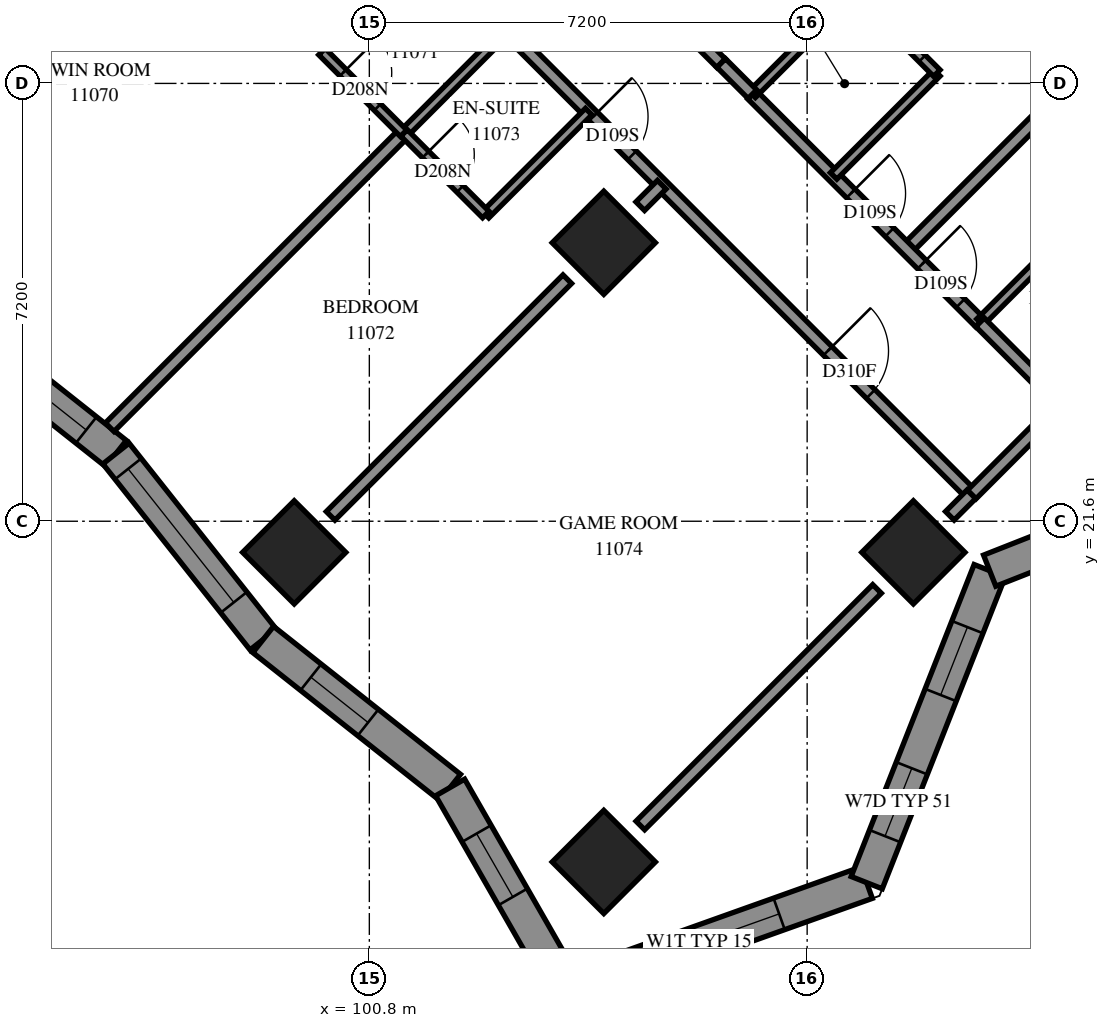
"""IFC4 building model, lengths in metres.
Left out: names, types, materials, properties, quantities, classifications, styles, units other than length and angle.
Written with IfcOpenShell. Run it as: python <this file> out.ifc"""

import sys

from ifc_helpers import new_model, si_unit, direction, frame, frame_2d, origin, origin_2d, place, context, subcontext, project, spatial, polyline, rectangle, outline, extrude, element, fill, save


model = new_model("IFC4")
c1 = context("Model", 3, precision=1e-05, world=origin(), true_north=direction((0.0, 1.0)))
c2 = subcontext(c1, "Body", "Model", "MODEL_VIEW")
j1 = project(units=[si_unit("LENGTHUNIT", "METRE"), si_unit("PLANEANGLEUNIT", "RADIAN")], contexts=[c1])
p1 = place(None, origin())
s1 = spatial("IfcSite", under=j1, at=p1, CompositionType="ELEMENT")
p2 = place(p1, origin())
s2 = spatial("IfcBuilding", under=s1, at=p2, CompositionType="ELEMENT")
p3 = place(p2, frame((0.0, 0.0, 44.0)))
s3 = spatial("IfcBuildingStorey", under=s2, at=p3, CompositionType="ELEMENT", Elevation=44.0)
for number, where, z_axis, x_axis in (
    (1, (104.656, 26.18, 0.0), (0.0, 0.0, 1.0), (0.707, -0.707, 0.0)),
    (2, (99.565, 21.088, 0.0), (0.0, 0.0, 1.0), (0.707, -0.707, 0.0)),
    (3, (109.747, 21.088, 0.0), (0.0, 0.0, 1.0), (0.707, -0.707, 0.0)),
    (4, (104.656, 15.997, 0.0), (0.0, 0.0, 1.0), (0.707, -0.707, 0.0)),
):
    element("IfcColumn", number, at=place(p3, frame(where, z_axis=z_axis, x_axis=x_axis)), inside=s3, PredefinedType="COLUMN", context=c2, shape_type="SweptSolid", body=[
        extrude(rectangle(XDim=1.2, YDim=1.2, at=origin_2d()), origin(), (0.0, 0.0, 1.0), 3.1),
    ])
p4 = place(p3, frame((104.037, 13.893, 0.0), z_axis=(0.0, 0.0, 1.0), x_axis=(0.9418436094, 0.3360515071, 0.0)))
e5 = element("IfcWall", 5, at=p4, inside=s3, PredefinedType="SOLIDWALL", context=c2, shape_type="SweptSolid", body=[
    extrude(outline(polyline([(-0.23, -0.275), (5.373, -0.275), (5.123, 0.275), (0.23, 0.275), (-0.23, -0.275)])), origin(), (0.0, 0.0, 1.0), 3.1),
])
p5 = place(p4, frame((0.919, 0.0, 0.5)))
e6 = element("IfcOpeningElement", 6, at=p5, cuts=e5, PredefinedType="OPENING", context=c2, shape_type="SweptSolid", body=[
    extrude(rectangle(XDim=2.8, YDim=2.45, at=frame_2d((1.4, 1.225))), frame((0.0, 0.285, 0.0), z_axis=(0.0, -1.0, 0.0), x_axis=(1.0, 0.0, 0.0)), (0.0, 0.0, 1.0), 0.57),
])
p6 = place(p3, frame((108.98, 15.657, 0.0), z_axis=(0.0, 0.0, 1.0), x_axis=(0.3667119279, 0.930334543, 0.0)))
e7 = element("IfcWall", 7, at=p6, inside=s3, PredefinedType="SOLIDWALL", context=c2, shape_type="SweptSolid", body=[
    extrude(outline(polyline([(-0.125, -0.275), (5.395, -0.275), (5.634, 0.275), (0.125, 0.275), (-0.125, -0.275)])), origin(), (0.0, 0.0, 1.0), 3.1),
])
p7 = place(p6, frame((0.822, 0.0, 0.5)))
e8 = element("IfcOpeningElement", 8, at=p7, cuts=e7, PredefinedType="OPENING", context=c2, shape_type="SweptSolid", body=[
    extrude(rectangle(XDim=1.2, YDim=2.45, at=frame_2d((0.6, 1.225))), frame((0.0, 0.285, 0.0), z_axis=(0.0, -1.0, 0.0), x_axis=(1.0, 0.0, 0.0)), (0.0, 0.0, 1.0), 0.57),
])
p8 = place(p6, frame((3.317, 0.0, 0.5)))
e9 = element("IfcOpeningElement", 9, at=p8, cuts=e7, PredefinedType="OPENING", context=c2, shape_type="SweptSolid", body=[
    extrude(rectangle(XDim=1.2, YDim=2.45, at=frame_2d((0.6, 1.225))), frame((0.0, 0.285, 0.0), z_axis=(0.0, -1.0, 0.0), x_axis=(1.0, 0.0, 0.0)), (0.0, 0.0, 1.0), 0.57),
])
p9 = place(p3, frame((111.002, 20.787, 0.0), z_axis=(0.0, 0.0, 1.0), x_axis=(0.930334543, 0.3667119279, 0.0)))
e10 = element("IfcWall", 10, at=p9, inside=s3, PredefinedType="SOLIDWALL", context=c2, shape_type="SweptSolid", body=[
    extrude(outline(polyline([(0.119, -0.275), (5.64, -0.275), (5.39, 0.275), (-0.119, 0.275), (0.119, -0.275)])), origin(), (0.0, 0.0, 1.0), 3.1),
])
p10 = place(p9, frame((1.178, 0.0, 0.5)))
e11 = element("IfcOpeningElement", 11, at=p10, cuts=e10, PredefinedType="OPENING", context=c2, shape_type="SweptSolid", body=[
    extrude(rectangle(XDim=2.8, YDim=2.45, at=frame_2d((1.4, 1.225))), frame((0.0, 0.285, 0.0), z_axis=(0.0, -1.0, 0.0), x_axis=(1.0, 0.0, 0.0)), (0.0, 0.0, 1.0), 0.57),
])
p11 = place(p3, frame((93.576, 25.134, 0.0), z_axis=(0.0, 0.0, 1.0), x_axis=(0.7841326465, -0.6205932587, 0.0)))
e12 = element("IfcWall", 12, at=p11, inside=s3, PredefinedType="SOLIDWALL", context=c2, shape_type="SweptSolid", body=[
    extrude(outline(polyline([(-0.032, -0.275), (3.868, -0.275), (3.932, 0.275), (0.032, 0.275), (-0.032, -0.275)])), origin(), (0.0, 0.0, 1.0), 3.1),
])
p12 = place(p11, frame((0.475, 0.0, 0.5)))
e13 = element("IfcOpeningElement", 13, at=p12, cuts=e12, PredefinedType="OPENING", context=c2, shape_type="SweptSolid", body=[
    extrude(rectangle(XDim=2.8, YDim=2.45, at=frame_2d((1.4, 1.225))), frame((0.0, 0.285, 0.0), z_axis=(0.0, -1.0, 0.0), x_axis=(1.0, 0.0, 0.0)), (0.0, 0.0, 1.0), 0.57),
])
p13 = place(p3, frame((96.634, 22.713, 0.0), z_axis=(0.0, 0.0, 1.0), x_axis=(0.6205932587, -0.7841326465, 0.0)))
e14 = element("IfcWall", 14, at=p13, inside=s3, PredefinedType="SOLIDWALL", context=c2, shape_type="SweptSolid", body=[
    extrude(outline(polyline([(0.032, -0.275), (3.932, -0.275), (3.868, 0.275), (-0.032, 0.275), (0.032, -0.275)])), origin(), (0.0, 0.0, 1.0), 3.1),
])
p14 = place(p13, frame((0.322, 0.0, 0.5)))
e15 = element("IfcOpeningElement", 15, at=p14, cuts=e14, PredefinedType="OPENING", context=c2, shape_type="SweptSolid", body=[
    extrude(rectangle(XDim=2.8, YDim=2.45, at=frame_2d((1.4, 1.225))), frame((0.0, 0.285, 0.0), z_axis=(0.0, -1.0, 0.0), x_axis=(1.0, 0.0, 0.0)), (0.0, 0.0, 1.0), 0.57),
])
p15 = place(p3, frame((99.054, 19.655, 0.0), z_axis=(0.0, 0.0, 1.0), x_axis=(0.7841399373, -0.6205840465, 0.0)))
e16 = element("IfcWall", 16, at=p15, inside=s3, PredefinedType="SOLIDWALL", context=c2, shape_type="SweptSolid", body=[
    extrude(outline(polyline([(-0.032, -0.275), (3.868, -0.275), (3.974, 0.275), (0.032, 0.275), (-0.032, -0.275)])), origin(), (0.0, 0.0, 1.0), 3.1),
])
p16 = place(p15, frame((1.0, 0.0, 0.5)))
e17 = element("IfcOpeningElement", 17, at=p16, cuts=e16, PredefinedType="OPENING", context=c2, shape_type="SweptSolid", body=[
    extrude(rectangle(XDim=1.2, YDim=2.45, at=frame_2d((0.6, 1.225))), frame((0.0, 0.285, 0.0), z_axis=(0.0, -1.0, 0.0), x_axis=(1.0, 0.0, 0.0)), (0.0, 0.0, 1.0), 0.57),
])
p17 = place(p3, frame((102.129, 17.222, 0.0), z_axis=(0.0, 0.0, 1.0), x_axis=(0.4972724343, -0.8675944479, 0.0)))
e18 = element("IfcWall", 18, at=p17, inside=s3, PredefinedType="SOLIDWALL", context=c2, shape_type="SweptSolid", body=[
    extrude(outline(polyline([(0.053, -0.275), (4.067, -0.275), (3.607, 0.275), (-0.053, 0.275), (0.053, -0.275)])), origin(), (0.0, 0.0, 1.0), 3.1),
])
p18 = place(p17, frame((0.875, 0.0, 0.5)))
e19 = element("IfcOpeningElement", 19, at=p18, cuts=e18, PredefinedType="OPENING", context=c2, shape_type="SweptSolid", body=[
    extrude(rectangle(XDim=1.2, YDim=2.45, at=frame_2d((0.6, 1.225))), frame((0.0, 0.285, 0.0), z_axis=(0.0, -1.0, 0.0), x_axis=(1.0, 0.0, 0.0)), (0.0, 0.0, 1.0), 0.57),
])
p19 = place(p3, frame((103.061, 29.677, 0.0), z_axis=(0.0, 0.0, 1.0), x_axis=(0.7071067812, -0.7071067812, 0.0)))
e20 = element("IfcWall", 20, at=p19, inside=s3, PredefinedType="PARTITIONING", context=c2, shape_type="SweptSolid", body=[
    extrude(rectangle(XDim=10.802, YDim=0.2, at=frame_2d((5.401, 0.0))), origin(), (0.0, 0.0, 1.0), 3.1),
])
p20 = place(p19, frame((2.012, 0.0, 0.0)))
e21 = element("IfcOpeningElement", 21, at=p20, cuts=e20, PredefinedType="OPENING", context=c2, shape_type="SweptSolid", body=[
    extrude(rectangle(XDim=0.9, YDim=2.1, at=frame_2d((0.45, 1.05))), frame((0.0, 0.11, 0.0), z_axis=(0.0, -1.0, 0.0), x_axis=(1.0, 0.0, 0.0)), (0.0, 0.0, 1.0), 0.22),
])
p21 = place(p19, frame((7.463, 0.0, 0.0)))
e22 = element("IfcOpeningElement", 22, at=p21, cuts=e20, PredefinedType="OPENING", context=c2, shape_type="SweptSolid", body=[
    extrude(rectangle(XDim=1.0, YDim=2.1, at=frame_2d((0.5, 1.05))), frame((0.0, 0.11, 0.0), z_axis=(0.0, -1.0, 0.0), x_axis=(1.0, 0.0, 0.0)), (0.0, 0.0, 1.0), 0.22),
])
p22 = place(p3, frame((96.53, 23.146, 0.0), z_axis=(0.0, 0.0, 1.0), x_axis=(0.7071140909, 0.7070994714, 0.0)))
e23 = element("IfcWall", 23, at=p22, inside=s3, PredefinedType="PARTITIONING", context=c2, shape_type="SweptSolid", body=[
    extrude(rectangle(XDim=6.84, YDim=0.2, at=frame_2d((3.42, 0.0))), origin(), (0.0, 0.0, 1.0), 3.1),
])
p23 = place(p3, frame((91.456, 28.255, 0.0), z_axis=(0.0, 0.0, 1.0), x_axis=(0.7071067812, 0.7071067812, 0.0)))
e24 = element("IfcWall", 24, at=p23, inside=s3, PredefinedType="PARTITIONING", context=c2, shape_type="SweptSolid", body=[
    extrude(rectangle(XDim=6.816, YDim=0.2, at=frame_2d((3.408, 0.0))), origin(), (0.0, 0.0, 1.0), 3.1),
])
p24 = place(p3, frame((109.64, 26.074, 0.0), z_axis=(0.0, 0.0, 1.0), x_axis=(0.7072538194, 0.7069597124, 0.0)))
e25 = element("IfcWall", 25, at=p24, inside=s3, PredefinedType="PARTITIONING", context=c2, shape_type="SweptSolid", body=[
    extrude(rectangle(XDim=6.8, YDim=0.2, at=frame_2d((3.4, 0.0))), origin(), (0.0, 0.0, 1.0), 3.1),
])
p25 = place(p3, frame((100.163, 21.689, 0.0), z_axis=(0.0, 0.0, 1.0), x_axis=(0.7071067812, 0.7071067812, 0.0)))
e26 = element("IfcWall", 26, at=p25, inside=s3, PredefinedType="PARTITIONING", context=c2, shape_type="SweptSolid", body=[
    extrude(rectangle(XDim=5.504, YDim=0.2, at=frame_2d((2.752, 0.0))), origin(), (0.0, 0.0, 1.0), 3.1),
])
p26 = place(p3, frame((105.257, 16.597, 0.0), z_axis=(0.0, 0.0, 1.0), x_axis=(0.7072884866, 0.706925029, 0.0)))
e27 = element("IfcWall", 27, at=p26, inside=s3, PredefinedType="PARTITIONING", context=c2, shape_type="SweptSolid", body=[
    extrude(rectangle(XDim=5.503, YDim=0.2, at=frame_2d((2.751, 0.0))), origin(), (0.0, 0.0, 1.0), 2.6),
])
p27 = place(p3, frame((107.093, 28.615, 0.0), z_axis=(0.0, 0.0, 1.0), x_axis=(0.7072011313, -0.7070124185, 0.0)))
e28 = element("IfcWall", 28, at=p27, inside=s3, PredefinedType="PARTITIONING", context=c2, shape_type="SweptSolid", body=[
    extrude(rectangle(XDim=5.299, YDim=0.2, at=frame_2d((2.65, 0.0))), origin(), (0.0, 0.0, 1.0), 3.1),
])
p28 = place(p27, frame((2.299, 0.0, 0.0)))
e29 = element("IfcOpeningElement", 29, at=p28, cuts=e28, PredefinedType="OPENING", context=c2, shape_type="SweptSolid", body=[
    extrude(rectangle(XDim=0.9, YDim=2.1, at=frame_2d((0.45, 1.05))), frame((0.0, 0.11, 0.0), z_axis=(0.0, -1.0, 0.0), x_axis=(1.0, 0.0, 0.0)), (0.0, 0.0, 1.0), 0.22),
])
p29 = place(p27, frame((3.949, 0.0, 0.0)))
e30 = element("IfcOpeningElement", 30, at=p29, cuts=e28, PredefinedType="OPENING", context=c2, shape_type="SweptSolid", body=[
    extrude(rectangle(XDim=0.9, YDim=2.1, at=frame_2d((0.45, 1.05))), frame((0.0, 0.11, 0.0), z_axis=(0.0, -1.0, 0.0), x_axis=(1.0, 0.0, 0.0)), (0.0, 0.0, 1.0), 0.22),
])
p30 = place(p3, frame((104.551, 31.165, 0.0), z_axis=(0.0, 0.0, 1.0), x_axis=(0.7074545101, -0.7067588812, 0.0)))
e31 = element("IfcWall", 31, at=p30, inside=s3, PredefinedType="PARTITIONING", context=c2, shape_type="SweptSolid", body=[
    extrude(rectangle(XDim=2.875, YDim=0.2, at=frame_2d((1.438, 0.0))), origin(), (0.0, 0.0, 1.0), 3.1),
])
p31 = place(p30, frame((0.148, 0.0, 0.0)))
e32 = element("IfcOpeningElement", 32, at=p31, cuts=e31, PredefinedType="OPENING", context=c2, shape_type="SweptSolid", body=[
    extrude(rectangle(XDim=0.9, YDim=2.1, at=frame_2d((0.45, 1.05))), frame((0.0, 0.11, 0.0), z_axis=(0.0, -1.0, 0.0), x_axis=(1.0, 0.0, 0.0)), (0.0, 0.0, 1.0), 0.22),
])
p32 = place(p3, frame((100.023, 29.327, 0.0), z_axis=(0.0, 0.0, 1.0), x_axis=(0.7071067812, 0.7071067812, 0.0)))
e33 = element("IfcWall", 33, at=p32, inside=s3, PredefinedType="PARTITIONING", context=c2, shape_type="SweptSolid", body=[
    extrude(rectangle(XDim=2.401, YDim=0.15, at=frame_2d((1.201, 0.0))), origin(), (0.0, 0.0, 1.0), 3.1),
])
for number, where, z_axis, x_axis in (
    (34, (101.371, 27.979, 0.0), (0.0, 0.0, 1.0), (0.707, 0.708, 0.0)),
    (35, (108.435, 27.279, 0.0), (0.0, 0.0, 1.0), (0.708, 0.707, 0.0)),
):
    element("IfcWall", number, at=place(p3, frame(where, z_axis=z_axis, x_axis=x_axis)), inside=s3, PredefinedType="PARTITIONING", context=c2, shape_type="SweptSolid", body=[
        extrude(rectangle(XDim=2.4, YDim=0.15, at=frame_2d((1.2, 0.0))), origin(), (0.0, 0.0, 1.0), 3.1),
    ])
for number, where, z_axis, x_axis in (
    (36, (102.711, 26.641, 0.0), (0.0, 0.0, 1.0), (0.707, 0.707, 0.0)),
    (37, (107.095, 28.621, 0.0), (0.0, 0.0, 1.0), (0.707, 0.707, 0.0)),
    (38, (110.843, 24.873, 0.0), (0.0, 0.0, 1.0), (0.707, 0.707, 0.0)),
):
    element("IfcWall", number, at=place(p3, frame(where, z_axis=z_axis, x_axis=x_axis)), inside=s3, PredefinedType="PARTITIONING", context=c2, shape_type="SweptSolid", body=[
        extrude(rectangle(XDim=2.398, YDim=0.15, at=frame_2d((1.199, 0.0))), origin(), (0.0, 0.0, 1.0), 3.1),
    ])
p33 = place(p3, frame((110.705, 22.039, 0.0), z_axis=(0.0, 0.0, 1.0), x_axis=(0.7066304548, 0.7075827869, 0.0)))
e39 = element("IfcWall", 39, at=p33, inside=s3, PredefinedType="PARTITIONING", context=c2, shape_type="SweptSolid", body=[
    extrude(rectangle(XDim=2.1, YDim=0.2, at=frame_2d((1.05, 0.0))), origin(), (0.0, 0.0, 1.0), 2.6),
])
p34 = place(p3, frame((100.021, 29.323, 0.0), z_axis=(0.0, 0.0, 1.0), x_axis=(0.7071067812, -0.7071067812, 0.0)))
e40 = element("IfcWall", 40, at=p34, inside=s3, PredefinedType="PARTITIONING", context=c2, shape_type="SweptSolid", body=[
    extrude(rectangle(XDim=1.901, YDim=0.15, at=frame_2d((0.95, 0.0))), origin(), (0.0, 0.0, 1.0), 3.1),
])
p35 = place(p34, frame((0.491, 0.0, 0.0)))
e41 = element("IfcOpeningElement", 41, at=p35, cuts=e40, PredefinedType="OPENING", context=c2, shape_type="SweptSolid", body=[
    extrude(rectangle(XDim=0.8, YDim=2.1, at=frame_2d((0.4, 1.05))), frame((0.0, 0.085, 0.0), z_axis=(0.0, -1.0, 0.0), x_axis=(1.0, 0.0, 0.0)), (0.0, 0.0, 1.0), 0.17),
])
p36 = place(p3, frame((108.789, 30.313, 0.0), z_axis=(0.0, 0.0, 1.0), x_axis=(0.7071067812, -0.7071067812, 0.0)))
e42 = element("IfcWall", 42, at=p36, inside=s3, PredefinedType="PARTITIONING", context=c2, shape_type="SweptSolid", body=[
    extrude(rectangle(XDim=1.901, YDim=0.15, at=frame_2d((0.95, 0.0))), origin(), (0.0, 0.0, 1.0), 3.1),
])
p37 = place(p36, frame((0.76, 0.0, 0.0)))
e43 = element("IfcOpeningElement", 43, at=p37, cuts=e42, PredefinedType="OPENING", context=c2, shape_type="SweptSolid", body=[
    extrude(rectangle(XDim=0.8, YDim=2.1, at=frame_2d((0.4, 1.05))), frame((0.0, 0.085, 0.0), z_axis=(0.0, -1.0, 0.0), x_axis=(1.0, 0.0, 0.0)), (0.0, 0.0, 1.0), 0.17),
])
p38 = place(p3, frame((110.843, 24.871, 0.0), z_axis=(0.0, 0.0, 1.0), x_axis=(0.7065800724, -0.7076330979, 0.0)))
e44 = element("IfcWall", 44, at=p38, inside=s3, PredefinedType="PARTITIONING", context=c2, shape_type="SweptSolid", body=[
    extrude(rectangle(XDim=1.899, YDim=0.2, at=frame_2d((0.95, 0.0))), origin(), (0.0, 0.0, 1.0), 3.1),
])
p39 = place(p3, frame((101.371, 27.985, 0.0), z_axis=(0.0, 0.0, 1.0), x_axis=(0.7076330979, -0.7065800724, 0.0)))
e45 = element("IfcWall", 45, at=p39, inside=s3, PredefinedType="PARTITIONING", context=c2, shape_type="SweptSolid", body=[
    extrude(rectangle(XDim=1.899, YDim=0.15, at=frame_2d((0.95, 0.0))), origin(), (0.0, 0.0, 1.0), 3.1),
])
p40 = place(p39, frame((0.501, 0.0, 0.0)))
e46 = element("IfcOpeningElement", 46, at=p40, cuts=e45, PredefinedType="OPENING", context=c2, shape_type="SweptSolid", body=[
    extrude(rectangle(XDim=0.8, YDim=2.1, at=frame_2d((0.4, 1.05))), frame((0.0, 0.085, 0.0), z_axis=(0.0, -1.0, 0.0), x_axis=(1.0, 0.0, 0.0)), (0.0, 0.0, 1.0), 0.17),
])
p41 = place(p3, frame((106.587, 29.135, 0.0), z_axis=(0.0, 0.0, 1.0), x_axis=(0.7071067812, -0.7071067812, 0.0)))
e47 = element("IfcWall", 47, at=p41, inside=s3, PredefinedType="PARTITIONING", context=c2, shape_type="SweptSolid", body=[
    extrude(rectangle(XDim=0.724, YDim=0.2, at=frame_2d((0.362, 0.0))), origin(), (0.0, 0.0, 1.0), 3.1),
])
p42 = place(p3, frame((105.255, 26.781, 0.0), z_axis=(0.0, 0.0, 1.0), x_axis=(0.7071067812, 0.7071067812, 0.0)))
e48 = element("IfcWall", 48, at=p42, inside=s3, PredefinedType="PARTITIONING", context=c2, shape_type="SweptSolid", body=[
    extrude(rectangle(XDim=0.501, YDim=0.2, at=frame_2d((0.25, 0.0))), origin(), (0.0, 0.0, 1.0), 3.1),
])
p43 = place(p3, frame((110.347, 21.689, 0.0), z_axis=(0.0, 0.0, 1.0), x_axis=(0.7071067812, 0.7071067812, 0.0)))
e49 = element("IfcWall", 49, at=p43, inside=s3, PredefinedType="PARTITIONING", context=c2, shape_type="SweptSolid", body=[
    extrude(rectangle(XDim=0.501, YDim=0.2, at=frame_2d((0.25, 0.0))), origin(), (0.0, 0.0, 1.0), 2.6),
])
p44 = place(p5, origin())
e50 = element("IfcWindow", 50, at=p44, inside=s3, PartitioningType="SINGLE_PANEL", PredefinedType="WINDOW", context=c2, shape_type="SweptSolid", body=[
    extrude(rectangle(XDim=2.8, YDim=2.45, at=frame_2d((1.4, 1.225))), frame((0.0, 0.155, 0.0), z_axis=(0.0, -1.0, 0.0), x_axis=(1.0, 0.0, 0.0)), (0.0, 0.0, 1.0), 0.06),
])
fill(e6, e50)
p45 = place(p7, origin())
e51 = element("IfcWindow", 51, at=p45, inside=s3, PartitioningType="SINGLE_PANEL", PredefinedType="WINDOW", context=c2, shape_type="SweptSolid", body=[
    extrude(rectangle(XDim=1.2, YDim=2.45, at=frame_2d((0.6, 1.225))), frame((0.0, 0.155, 0.0), z_axis=(0.0, -1.0, 0.0), x_axis=(1.0, 0.0, 0.0)), (0.0, 0.0, 1.0), 0.06),
])
fill(e8, e51)
p46 = place(p8, origin())
e52 = element("IfcWindow", 52, at=p46, inside=s3, PartitioningType="SINGLE_PANEL", PredefinedType="WINDOW", context=c2, shape_type="SweptSolid", body=[
    extrude(rectangle(XDim=1.2, YDim=2.45, at=frame_2d((0.6, 1.225))), frame((0.0, 0.155, 0.0), z_axis=(0.0, -1.0, 0.0), x_axis=(1.0, 0.0, 0.0)), (0.0, 0.0, 1.0), 0.06),
])
fill(e9, e52)
p47 = place(p12, origin())
e53 = element("IfcWindow", 53, at=p47, inside=s3, PartitioningType="SINGLE_PANEL", PredefinedType="WINDOW", context=c2, shape_type="SweptSolid", body=[
    extrude(rectangle(XDim=2.8, YDim=2.45, at=frame_2d((1.4, 1.225))), frame((0.0, 0.155, 0.0), z_axis=(0.0, -1.0, 0.0), x_axis=(1.0, 0.0, 0.0)), (0.0, 0.0, 1.0), 0.06),
])
fill(e13, e53)
p48 = place(p14, origin())
e54 = element("IfcWindow", 54, at=p48, inside=s3, PartitioningType="SINGLE_PANEL", PredefinedType="WINDOW", context=c2, shape_type="SweptSolid", body=[
    extrude(rectangle(XDim=2.8, YDim=2.45, at=frame_2d((1.4, 1.225))), frame((0.0, 0.155, 0.0), z_axis=(0.0, -1.0, 0.0), x_axis=(1.0, 0.0, 0.0)), (0.0, 0.0, 1.0), 0.06),
])
fill(e15, e54)
p49 = place(p16, origin())
e55 = element("IfcWindow", 55, at=p49, inside=s3, PartitioningType="SINGLE_PANEL", PredefinedType="WINDOW", context=c2, shape_type="SweptSolid", body=[
    extrude(rectangle(XDim=1.2, YDim=2.45, at=frame_2d((0.6, 1.225))), frame((0.0, 0.155, 0.0), z_axis=(0.0, -1.0, 0.0), x_axis=(1.0, 0.0, 0.0)), (0.0, 0.0, 1.0), 0.06),
])
fill(e17, e55)
p50 = place(p18, origin())
e56 = element("IfcWindow", 56, at=p50, inside=s3, PartitioningType="SINGLE_PANEL", PredefinedType="WINDOW", context=c2, shape_type="SweptSolid", body=[
    extrude(rectangle(XDim=1.2, YDim=2.45, at=frame_2d((0.6, 1.225))), frame((0.0, 0.155, 0.0), z_axis=(0.0, -1.0, 0.0), x_axis=(1.0, 0.0, 0.0)), (0.0, 0.0, 1.0), 0.06),
])
fill(e19, e56)
p51 = place(p28, origin())
e57 = element("IfcDoor", 57, at=p51, inside=s3, OperationType="SINGLE_SWING_LEFT", PredefinedType="DOOR", context=c2, shape_type="SweptSolid", body=[
    extrude(rectangle(XDim=0.9, YDim=2.1, at=frame_2d((0.45, 1.05))), frame((0.0, 0.025, 0.0), z_axis=(0.0, -1.0, 0.0), x_axis=(1.0, 0.0, 0.0)), (0.0, 0.0, 1.0), 0.05),
])
fill(e29, e57)
p52 = place(p37, origin())
e58 = element("IfcDoor", 58, at=p52, inside=s3, OperationType="SINGLE_SWING_RIGHT", PredefinedType="DOOR", context=c2, shape_type="SweptSolid", body=[
    extrude(rectangle(XDim=0.8, YDim=2.1, at=frame_2d((0.4, 1.05))), frame((0.0, 0.025, 0.0), z_axis=(0.0, -1.0, 0.0), x_axis=(1.0, 0.0, 0.0)), (0.0, 0.0, 1.0), 0.05),
])
fill(e43, e58)
p53 = place(p35, origin())
e59 = element("IfcDoor", 59, at=p53, inside=s3, OperationType="SINGLE_SWING_RIGHT", PredefinedType="DOOR", context=c2, shape_type="SweptSolid", body=[
    extrude(rectangle(XDim=0.8, YDim=2.1, at=frame_2d((0.4, 1.05))), frame((0.0, 0.025, 0.0), z_axis=(0.0, -1.0, 0.0), x_axis=(1.0, 0.0, 0.0)), (0.0, 0.0, 1.0), 0.05),
])
fill(e41, e59)
p54 = place(p20, origin())
e60 = element("IfcDoor", 60, at=p54, inside=s3, OperationType="SINGLE_SWING_LEFT", PredefinedType="DOOR", context=c2, shape_type="SweptSolid", body=[
    extrude(rectangle(XDim=0.9, YDim=2.1, at=frame_2d((0.45, 1.05))), frame((0.0, 0.025, 0.0), z_axis=(0.0, -1.0, 0.0), x_axis=(1.0, 0.0, 0.0)), (0.0, 0.0, 1.0), 0.05),
])
fill(e21, e60)
p55 = place(p40, origin())
e61 = element("IfcDoor", 61, at=p55, inside=s3, OperationType="SINGLE_SWING_RIGHT", PredefinedType="DOOR", context=c2, shape_type="SweptSolid", body=[
    extrude(rectangle(XDim=0.8, YDim=2.1, at=frame_2d((0.4, 1.05))), frame((0.0, 0.025, 0.0), z_axis=(0.0, -1.0, 0.0), x_axis=(1.0, 0.0, 0.0)), (0.0, 0.0, 1.0), 0.05),
])
fill(e46, e61)
p56 = place(p21, origin())
e62 = element("IfcDoor", 62, at=p56, inside=s3, OperationType="SINGLE_SWING_RIGHT", PredefinedType="DOOR", context=c2, shape_type="SweptSolid", body=[
    extrude(rectangle(XDim=1.0, YDim=2.1, at=frame_2d((0.5, 1.05))), frame((0.0, 0.025, 0.0), z_axis=(0.0, -1.0, 0.0), x_axis=(1.0, 0.0, 0.0)), (0.0, 0.0, 1.0), 0.05),
])
fill(e22, e62)
p57 = place(p29, origin())
e63 = element("IfcDoor", 63, at=p57, inside=s3, OperationType="SINGLE_SWING_RIGHT", PredefinedType="DOOR", context=c2, shape_type="SweptSolid", body=[
    extrude(rectangle(XDim=0.9, YDim=2.1, at=frame_2d((0.45, 1.05))), frame((0.0, 0.025, 0.0), z_axis=(0.0, -1.0, 0.0), x_axis=(1.0, 0.0, 0.0)), (0.0, 0.0, 1.0), 0.05),
])
fill(e30, e63)
save(model, sys.argv[1])
